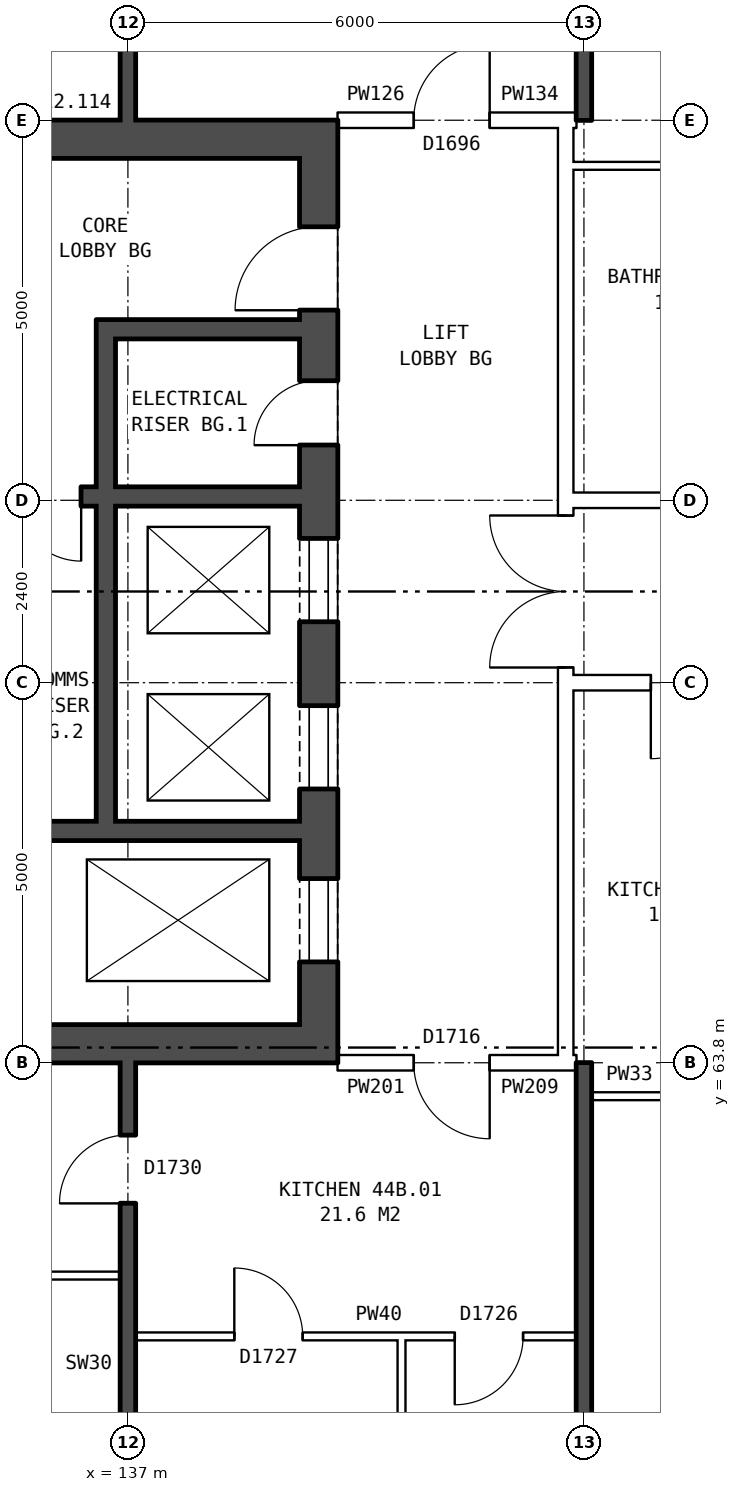
"""IFC4 building model, lengths in metres.
Left out: names, types, materials, properties, quantities, classifications, styles, units other than length and angle.
Written with IfcOpenShell. Run it as: python <this file> out.ifc"""

import sys

from ifc_helpers import new_model, si_unit, direction, frame, frame_2d, origin, place, context, subcontext, project, spatial, rectangle, extrude, element, fill, save


model = new_model("IFC4")
c1 = context("Model", 3, precision=1e-05, world=origin(), true_north=direction((0.0, 1.0)))
c2 = subcontext(c1, "Body", "Model", "MODEL_VIEW")
j1 = project(units=[si_unit("LENGTHUNIT", "METRE"), si_unit("PLANEANGLEUNIT", "RADIAN")], contexts=[c1])
p1 = place(None, origin())
s1 = spatial("IfcSite", under=j1, at=p1, CompositionType="ELEMENT")
p2 = place(p1, origin())
s2 = spatial("IfcBuilding", under=s1, at=p2, CompositionType="ELEMENT")
p3 = place(p2, frame((0.0, 0.0, 157.8)))
s3 = spatial("IfcBuildingStorey", under=s2, at=p3, CompositionType="ELEMENT", Elevation=157.8)
p4 = place(p3, frame((139.51, 63.8, 0.0), z_axis=(0.0, 0.0, 1.0), x_axis=(0.0, 1.0, 0.0)))
e1 = element("IfcWall", 1, at=p4, inside=s3, PredefinedType="SHEAR", context=c2, shape_type="SweptSolid", body=[
    extrude(rectangle(XDim=12.4, YDim=0.5, at=frame_2d((6.2, 0.0))), origin(), (0.0, 0.0, 1.0), 2.85),
])
p5 = place(p4, frame((1.325, 0.0, 0.0)))
e2 = element("IfcOpeningElement", 2, at=p5, cuts=e1, PredefinedType="OPENING", context=c2, shape_type="SweptSolid", body=[
    extrude(rectangle(XDim=1.1, YDim=2.1, at=frame_2d((0.55, 1.05))), frame((0.0, 0.26, 0.0), z_axis=(0.0, -1.0, 0.0), x_axis=(1.0, 0.0, 0.0)), (0.0, 0.0, 1.0), 0.52),
])
p6 = place(p4, frame((3.6, 0.0, 0.0)))
e3 = element("IfcOpeningElement", 3, at=p6, cuts=e1, PredefinedType="OPENING", context=c2, shape_type="SweptSolid", body=[
    extrude(rectangle(XDim=1.1, YDim=2.1, at=frame_2d((0.55, 1.05))), frame((0.0, 0.26, 0.0), z_axis=(0.0, -1.0, 0.0), x_axis=(1.0, 0.0, 0.0)), (0.0, 0.0, 1.0), 0.52),
])
p7 = place(p4, frame((5.8, 0.0, 0.0)))
e4 = element("IfcOpeningElement", 4, at=p7, cuts=e1, PredefinedType="OPENING", context=c2, shape_type="SweptSolid", body=[
    extrude(rectangle(XDim=1.1, YDim=2.1, at=frame_2d((0.55, 1.05))), frame((0.0, 0.26, 0.0), z_axis=(0.0, -1.0, 0.0), x_axis=(1.0, 0.0, 0.0)), (0.0, 0.0, 1.0), 0.52),
])
p8 = place(p4, frame((9.9, 0.0, 0.0)))
e5 = element("IfcOpeningElement", 5, at=p8, cuts=e1, PredefinedType="OPENING", context=c2, shape_type="SweptSolid", body=[
    extrude(rectangle(XDim=1.1, YDim=2.1, at=frame_2d((0.55, 1.05))), frame((0.0, 0.26, 0.0), z_axis=(0.0, -1.0, 0.0), x_axis=(1.0, 0.0, 0.0)), (0.0, 0.0, 1.0), 0.52),
])
p9 = place(p4, frame((8.125, 0.0, 0.0)))
e6 = element("IfcOpeningElement", 6, at=p9, cuts=e1, PredefinedType="OPENING", context=c2, shape_type="SweptSolid", body=[
    extrude(rectangle(XDim=0.85, YDim=2.1, at=frame_2d((0.425, 1.05))), frame((0.0, 0.26, 0.0), z_axis=(0.0, -1.0, 0.0), x_axis=(1.0, 0.0, 0.0)), (0.0, 0.0, 1.0), 0.52),
])
for number, where, z_axis, x_axis in (
    (7, (139.26, 64.05, 0.0), (0.0, 0.0, 1.0), (-1.0, 0.0, 0.0)),
    (8, (139.26, 75.95, 0.0), (0.0, 0.0, 1.0), (-1.0, 0.0, 0.0)),
):
    element("IfcWall", number, at=place(p3, frame(where, z_axis=z_axis, x_axis=x_axis)), inside=s3, PredefinedType="SHEAR", context=c2, shape_type="SweptSolid", body=[
        extrude(rectangle(XDim=7.4, YDim=0.5, at=frame_2d((3.7, 0.0))), origin(), (0.0, 0.0, 1.0), 2.85),
    ])
p10 = place(p3, frame((139.26, 66.85, 0.0), z_axis=(0.0, 0.0, 1.0), x_axis=(-1.0, 0.0, 0.0)))
e9 = element("IfcWall", 9, at=p10, inside=s3, PredefinedType="SHEAR", context=c2, shape_type="SweptSolid", body=[
    extrude(rectangle(XDim=4.575, YDim=0.25, at=frame_2d((2.288, 0.0))), origin(), (0.0, 0.0, 1.0), 2.85),
])
p11 = place(p3, frame((139.26, 71.25, 0.0), z_axis=(0.0, 0.0, 1.0), x_axis=(-1.0, 0.0, 0.0)))
e10 = element("IfcWall", 10, at=p11, inside=s3, PredefinedType="SHEAR", context=c2, shape_type="SweptSolid", body=[
    extrude(rectangle(XDim=7.4, YDim=0.25, at=frame_2d((3.7, 0.0))), origin(), (0.0, 0.0, 1.0), 2.85),
])
p12 = place(p11, frame((4.975, 0.0, 0.0)))
e11 = element("IfcOpeningElement", 11, at=p12, cuts=e10, PredefinedType="OPENING", context=c2, shape_type="SweptSolid", body=[
    extrude(rectangle(XDim=1.1, YDim=2.1, at=frame_2d((0.55, 1.05))), frame((0.0, 0.135, 0.0), z_axis=(0.0, -1.0, 0.0), x_axis=(1.0, 0.0, 0.0)), (0.0, 0.0, 1.0), 0.27),
])
p13 = place(p11, frame((2.875, 0.0, 0.0)))
e12 = element("IfcOpeningElement", 12, at=p13, cuts=e10, PredefinedType="OPENING", context=c2, shape_type="SweptSolid", body=[
    extrude(rectangle(XDim=0.85, YDim=2.1, at=frame_2d((0.425, 1.05))), frame((0.0, 0.135, 0.0), z_axis=(0.0, -1.0, 0.0), x_axis=(1.0, 0.0, 0.0)), (0.0, 0.0, 1.0), 0.27),
])
p14 = place(p3, frame((139.26, 73.45, 0.0), z_axis=(0.0, 0.0, 1.0), x_axis=(-1.0, 0.0, 0.0)))
e13 = element("IfcWall", 13, at=p14, inside=s3, PredefinedType="SHEAR", context=c2, shape_type="SweptSolid", body=[
    extrude(rectangle(XDim=2.425, YDim=0.25, at=frame_2d((1.212, 0.0))), origin(), (0.0, 0.0, 1.0), 2.85),
])
p15 = place(p3, frame((136.71, 66.975, 0.0), z_axis=(0.0, 0.0, 1.0), x_axis=(0.0, 1.0, 0.0)))
e14 = element("IfcWall", 14, at=p15, inside=s3, PredefinedType="SHEAR", context=c2, shape_type="SweptSolid", body=[
    extrude(rectangle(XDim=4.15, YDim=0.25, at=frame_2d((2.075, 0.0))), origin(), (0.0, 0.0, 1.0), 2.85),
])
p16 = place(p3, frame((136.71, 71.375, 0.0), z_axis=(0.0, 0.0, 1.0), x_axis=(0.0, 1.0, 0.0)))
e15 = element("IfcWall", 15, at=p16, inside=s3, PredefinedType="SHEAR", context=c2, shape_type="SweptSolid", body=[
    extrude(rectangle(XDim=2.2, YDim=0.25, at=frame_2d((1.1, 0.0))), origin(), (0.0, 0.0, 1.0), 2.85),
])
p17 = place(p3, frame((142.76, 63.9, 0.0), z_axis=(0.0, 0.0, 1.0), x_axis=(0.0, 1.0, 0.0)))
e16 = element("IfcWall", 16, at=p17, inside=s3, PredefinedType="PARTITIONING", context=c2, shape_type="SweptSolid", body=[
    extrude(rectangle(XDim=12.2, YDim=0.2, at=frame_2d((6.1, 0.0))), origin(), (0.0, 0.0, 1.0), 2.85),
])
p18 = place(p17, frame((5.1, 0.0, 0.0)))
e17 = element("IfcOpeningElement", 17, at=p18, cuts=e16, PredefinedType="OPENING", context=c2, shape_type="SweptSolid", body=[
    extrude(rectangle(XDim=2.0, YDim=2.1, at=frame_2d((1.0, 1.05))), frame((0.0, 0.11, 0.0), z_axis=(0.0, -1.0, 0.0), x_axis=(1.0, 0.0, 0.0)), (0.0, 0.0, 1.0), 0.22),
])
p19 = place(p3, frame((137.1, 60.2, 0.0), z_axis=(0.0, 0.0, 1.0), x_axis=(1.0, 0.0, 0.0)))
e18 = element("IfcWall", 18, at=p19, inside=s3, PredefinedType="PARTITIONING", context=c2, shape_type="SweptSolid", body=[
    extrude(rectangle(XDim=5.8, YDim=0.1, at=frame_2d((2.9, 0.0))), origin(), (0.0, 0.0, 1.0), 2.85),
])
p20 = place(p19, frame((1.3, 0.0, 0.0)))
e19 = element("IfcOpeningElement", 19, at=p20, cuts=e18, PredefinedType="OPENING", context=c2, shape_type="SweptSolid", body=[
    extrude(rectangle(XDim=0.9, YDim=2.1, at=frame_2d((0.45, 1.05))), frame((0.0, 0.06, 0.0), z_axis=(0.0, -1.0, 0.0), x_axis=(1.0, 0.0, 0.0)), (0.0, 0.0, 1.0), 0.12),
])
p21 = place(p19, frame((4.2, 0.0, 0.0)))
e20 = element("IfcOpeningElement", 20, at=p21, cuts=e18, PredefinedType="OPENING", context=c2, shape_type="SweptSolid", body=[
    extrude(rectangle(XDim=0.9, YDim=2.1, at=frame_2d((0.45, 1.05))), frame((0.0, 0.06, 0.0), z_axis=(0.0, -1.0, 0.0), x_axis=(1.0, 0.0, 0.0)), (0.0, 0.0, 1.0), 0.12),
])
p22 = place(p3, frame((131.36, 61.0, 0.0), z_axis=(0.0, 0.0, 1.0), x_axis=(1.0, 0.0, 0.0)))
e21 = element("IfcWall", 21, at=p22, inside=s3, PredefinedType="PARTITIONING", context=c2, shape_type="SweptSolid", body=[
    extrude(rectangle(XDim=5.54, YDim=0.1, at=frame_2d((2.77, 0.0))), origin(), (0.0, 0.0, 1.0), 2.85),
])
p23 = place(p3, frame((143.1, 63.36, 0.0), z_axis=(0.0, 0.0, 1.0), x_axis=(1.0, 0.0, 0.0)))
e22 = element("IfcWall", 22, at=p23, inside=s3, PredefinedType="PARTITIONING", context=c2, shape_type="SweptSolid", body=[
    extrude(rectangle(XDim=2.9, YDim=0.1, at=frame_2d((1.45, 0.0))), origin(), (0.0, 0.0, 1.0), 2.85),
])
p24 = place(p23, frame((1.0, 0.0, 0.0)))
e23 = element("IfcOpeningElement", 23, at=p24, cuts=e22, PredefinedType="OPENING", context=c2, shape_type="SweptSolid", body=[
    extrude(rectangle(XDim=0.9, YDim=2.1, at=frame_2d((0.45, 1.05))), frame((0.0, 0.06, 0.0), z_axis=(0.0, -1.0, 0.0), x_axis=(1.0, 0.0, 0.0)), (0.0, 0.0, 1.0), 0.12),
])
p25 = place(p3, frame((139.76, 63.8, 0.0), z_axis=(0.0, 0.0, 1.0), x_axis=(1.0, 0.0, 0.0)))
e24 = element("IfcWall", 24, at=p25, inside=s3, PredefinedType="PARTITIONING", context=c2, shape_type="SweptSolid", body=[
    extrude(rectangle(XDim=3.0, YDim=0.2, at=frame_2d((1.5, 0.0))), origin(), (0.0, 0.0, 1.0), 2.85),
])
p26 = place(p25, frame((1.0, 0.0, 0.0)))
e25 = element("IfcOpeningElement", 25, at=p26, cuts=e24, PredefinedType="OPENING", context=c2, shape_type="SweptSolid", body=[
    extrude(rectangle(XDim=1.0, YDim=2.1, at=frame_2d((0.5, 1.05))), frame((0.0, 0.11, 0.0), z_axis=(0.0, -1.0, 0.0), x_axis=(1.0, 0.0, 0.0)), (0.0, 0.0, 1.0), 0.22),
])
p27 = place(p3, frame((142.76, 63.8, 0.0), z_axis=(0.0, 0.0, 1.0), x_axis=(1.0, 0.0, 0.0)))
e26 = element("IfcWall", 26, at=p27, inside=s3, PredefinedType="PARTITIONING", context=c2, shape_type="SweptSolid", body=[
    extrude(rectangle(XDim=0.14, YDim=0.2, at=frame_2d((0.07, 0.0))), origin(), (0.0, 0.0, 1.0), 2.85),
])
p28 = place(p3, frame((142.76, 68.8, 0.0), z_axis=(0.0, 0.0, 1.0), x_axis=(1.0, 0.0, 0.0)))
e27 = element("IfcWall", 27, at=p28, inside=s3, PredefinedType="PARTITIONING", context=c2, shape_type="SweptSolid", body=[
    extrude(rectangle(XDim=14.48, YDim=0.2, at=frame_2d((7.24, 0.0))), origin(), (0.0, 0.0, 1.0), 2.85),
])
p29 = place(p28, frame((1.12, 0.0, 0.0)))
e28 = element("IfcOpeningElement", 28, at=p29, cuts=e27, PredefinedType="OPENING", context=c2, shape_type="SweptSolid", body=[
    extrude(rectangle(XDim=1.0, YDim=2.1, at=frame_2d((0.5, 1.05))), frame((0.0, 0.11, 0.0), z_axis=(0.0, -1.0, 0.0), x_axis=(1.0, 0.0, 0.0)), (0.0, 0.0, 1.0), 0.22),
])
p30 = place(p28, frame((7.24, 0.0, 0.0)))
e29 = element("IfcOpeningElement", 29, at=p30, cuts=e27, PredefinedType="OPENING", context=c2, shape_type="SweptSolid", body=[
    extrude(rectangle(XDim=1.0, YDim=2.1, at=frame_2d((0.5, 1.05))), frame((0.0, 0.11, 0.0), z_axis=(0.0, -1.0, 0.0), x_axis=(1.0, 0.0, 0.0)), (0.0, 0.0, 1.0), 0.22),
])
p31 = place(p3, frame((142.76, 71.2, 0.0), z_axis=(0.0, 0.0, 1.0), x_axis=(1.0, 0.0, 0.0)))
e30 = element("IfcWall", 30, at=p31, inside=s3, PredefinedType="PARTITIONING", context=c2, shape_type="SweptSolid", body=[
    extrude(rectangle(XDim=14.48, YDim=0.2, at=frame_2d((7.24, 0.0))), origin(), (0.0, 0.0, 1.0), 2.85),
])
p32 = place(p31, frame((4.24, 0.0, 0.0)))
e31 = element("IfcOpeningElement", 31, at=p32, cuts=e30, PredefinedType="OPENING", context=c2, shape_type="SweptSolid", body=[
    extrude(rectangle(XDim=1.0, YDim=2.1, at=frame_2d((0.5, 1.05))), frame((0.0, 0.11, 0.0), z_axis=(0.0, -1.0, 0.0), x_axis=(1.0, 0.0, 0.0)), (0.0, 0.0, 1.0), 0.22),
])
p33 = place(p31, frame((7.24, 0.0, 0.0)))
e32 = element("IfcOpeningElement", 32, at=p33, cuts=e30, PredefinedType="OPENING", context=c2, shape_type="SweptSolid", body=[
    extrude(rectangle(XDim=1.0, YDim=2.1, at=frame_2d((0.5, 1.05))), frame((0.0, 0.11, 0.0), z_axis=(0.0, -1.0, 0.0), x_axis=(1.0, 0.0, 0.0)), (0.0, 0.0, 1.0), 0.22),
])
p34 = place(p3, frame((142.76, 75.6, 0.0), z_axis=(0.0, 0.0, 1.0), x_axis=(1.0, 0.0, 0.0)))
e33 = element("IfcWall", 33, at=p34, inside=s3, PredefinedType="PARTITIONING", context=c2, shape_type="SweptSolid", body=[
    extrude(rectangle(XDim=3.24, YDim=0.1, at=frame_2d((1.62, 0.0))), origin(), (0.0, 0.0, 1.0), 2.85),
])
p35 = place(p3, frame((139.76, 76.2, 0.0), z_axis=(0.0, 0.0, 1.0), x_axis=(1.0, 0.0, 0.0)))
e34 = element("IfcWall", 34, at=p35, inside=s3, PredefinedType="PARTITIONING", context=c2, shape_type="SweptSolid", body=[
    extrude(rectangle(XDim=3.0, YDim=0.2, at=frame_2d((1.5, 0.0))), origin(), (0.0, 0.0, 1.0), 2.85),
])
p36 = place(p35, frame((1.0, 0.0, 0.0)))
e35 = element("IfcOpeningElement", 35, at=p36, cuts=e34, PredefinedType="OPENING", context=c2, shape_type="SweptSolid", body=[
    extrude(rectangle(XDim=1.0, YDim=2.1, at=frame_2d((0.5, 1.05))), frame((0.0, 0.11, 0.0), z_axis=(0.0, -1.0, 0.0), x_axis=(1.0, 0.0, 0.0)), (0.0, 0.0, 1.0), 0.22),
])
p37 = place(p3, frame((142.76, 76.2, 0.0), z_axis=(0.0, 0.0, 1.0), x_axis=(1.0, 0.0, 0.0)))
e36 = element("IfcWall", 36, at=p37, inside=s3, PredefinedType="PARTITIONING", context=c2, shape_type="SweptSolid", body=[
    extrude(rectangle(XDim=0.14, YDim=0.2, at=frame_2d((0.07, 0.0))), origin(), (0.0, 0.0, 1.0), 2.85),
])
p38 = place(p3, frame((137.0, 54.36, 0.0), z_axis=(0.0, 0.0, 1.0), x_axis=(0.0, 1.0, 0.0)))
e37 = element("IfcWall", 37, at=p38, inside=s3, PredefinedType="SOLIDWALL", context=c2, shape_type="SweptSolid", body=[
    extrude(rectangle(XDim=9.44, YDim=0.2, at=frame_2d((4.72, 0.0))), origin(), (0.0, 0.0, 1.0), 2.85),
])
p39 = place(p38, frame((2.47, 0.0, 0.0)))
e38 = element("IfcOpeningElement", 38, at=p39, cuts=e37, PredefinedType="OPENING", context=c2, shape_type="SweptSolid", body=[
    extrude(rectangle(XDim=0.9, YDim=2.1, at=frame_2d((0.45, 1.05))), frame((0.0, 0.11, 0.0), z_axis=(0.0, -1.0, 0.0), x_axis=(1.0, 0.0, 0.0)), (0.0, 0.0, 1.0), 0.22),
])
p40 = place(p38, frame((7.59, 0.0, 0.0)))
e39 = element("IfcOpeningElement", 39, at=p40, cuts=e37, PredefinedType="OPENING", context=c2, shape_type="SweptSolid", body=[
    extrude(rectangle(XDim=0.9, YDim=2.1, at=frame_2d((0.45, 1.05))), frame((0.0, 0.11, 0.0), z_axis=(0.0, -1.0, 0.0), x_axis=(1.0, 0.0, 0.0)), (0.0, 0.0, 1.0), 0.22),
])
p41 = place(p3, frame((137.0, 76.2, 0.0), z_axis=(0.0, 0.0, 1.0), x_axis=(0.0, 1.0, 0.0)))
e40 = element("IfcWall", 40, at=p41, inside=s3, PredefinedType="SOLIDWALL", context=c2, shape_type="SweptSolid", body=[
    extrude(rectangle(XDim=9.44, YDim=0.2, at=frame_2d((4.72, 0.0))), origin(), (0.0, 0.0, 1.0), 2.85),
])
p42 = place(p41, frame((1.35, 0.0, 0.0)))
e41 = element("IfcOpeningElement", 41, at=p42, cuts=e40, PredefinedType="OPENING", context=c2, shape_type="SweptSolid", body=[
    extrude(rectangle(XDim=0.9, YDim=2.1, at=frame_2d((0.45, 1.05))), frame((0.0, 0.11, 0.0), z_axis=(0.0, -1.0, 0.0), x_axis=(1.0, 0.0, 0.0)), (0.0, 0.0, 1.0), 0.22),
])
p43 = place(p3, frame((140.6, 57.85, 0.0), z_axis=(0.0, 0.0, 1.0), x_axis=(0.0, 1.0, 0.0)))
e42 = element("IfcWall", 42, at=p43, inside=s3, PredefinedType="PARTITIONING", context=c2, shape_type="SweptSolid", body=[
    extrude(rectangle(XDim=2.3, YDim=0.1, at=frame_2d((1.15, 0.0))), origin(), (0.0, 0.0, 1.0), 2.85),
])
for number, where, z_axis, x_axis in (
    (43, (143.0, 54.36, 0.0), (0.0, 0.0, 1.0), (0.0, 1.0, 0.0)),
    (44, (143.0, 76.2, 0.0), (0.0, 0.0, 1.0), (0.0, 1.0, 0.0)),
):
    element("IfcWall", number, at=place(p3, frame(where, z_axis=z_axis, x_axis=x_axis)), inside=s3, PredefinedType="SOLIDWALL", context=c2, shape_type="SweptSolid", body=[
        extrude(rectangle(XDim=9.44, YDim=0.2, at=frame_2d((4.72, 0.0))), origin(), (0.0, 0.0, 1.0), 2.85),
    ])
p44 = place(p5, origin())
e45 = element("IfcDoor", 45, at=p44, inside=s3, OperationType="DOUBLE_DOOR_SLIDING", PredefinedType="DOOR", context=c2, shape_type="SweptSolid", body=[
    extrude(rectangle(XDim=1.1, YDim=2.1, at=frame_2d((0.55, 1.05))), frame((0.0, 0.235, 0.0), z_axis=(0.0, -1.0, 0.0), x_axis=(1.0, 0.0, 0.0)), (0.0, 0.0, 1.0), 0.05),
])
fill(e2, e45)
p45 = place(p6, origin())
e46 = element("IfcDoor", 46, at=p45, inside=s3, OperationType="DOUBLE_DOOR_SLIDING", PredefinedType="DOOR", context=c2, shape_type="SweptSolid", body=[
    extrude(rectangle(XDim=1.1, YDim=2.1, at=frame_2d((0.55, 1.05))), frame((0.0, 0.235, 0.0), z_axis=(0.0, -1.0, 0.0), x_axis=(1.0, 0.0, 0.0)), (0.0, 0.0, 1.0), 0.05),
])
fill(e3, e46)
p46 = place(p7, origin())
e47 = element("IfcDoor", 47, at=p46, inside=s3, OperationType="DOUBLE_DOOR_SLIDING", PredefinedType="DOOR", context=c2, shape_type="SweptSolid", body=[
    extrude(rectangle(XDim=1.1, YDim=2.1, at=frame_2d((0.55, 1.05))), frame((0.0, 0.235, 0.0), z_axis=(0.0, -1.0, 0.0), x_axis=(1.0, 0.0, 0.0)), (0.0, 0.0, 1.0), 0.05),
])
fill(e4, e47)
p47 = place(p8, origin())
e48 = element("IfcDoor", 48, at=p47, inside=s3, OperationType="SINGLE_SWING_LEFT", PredefinedType="DOOR", context=c2, shape_type="SweptSolid", body=[
    extrude(rectangle(XDim=1.1, YDim=2.1, at=frame_2d((0.55, 1.05))), frame((0.0, 0.235, 0.0), z_axis=(0.0, -1.0, 0.0), x_axis=(1.0, 0.0, 0.0)), (0.0, 0.0, 1.0), 0.05),
])
fill(e5, e48)
p48 = place(p9, origin())
e49 = element("IfcDoor", 49, at=p48, inside=s3, OperationType="SINGLE_SWING_LEFT", PredefinedType="DOOR", context=c2, shape_type="SweptSolid", body=[
    extrude(rectangle(XDim=0.85, YDim=2.1, at=frame_2d((0.425, 1.05))), frame((0.0, 0.235, 0.0), z_axis=(0.0, -1.0, 0.0), x_axis=(1.0, 0.0, 0.0)), (0.0, 0.0, 1.0), 0.05),
])
fill(e6, e49)
p49 = place(p13, origin())
e50 = element("IfcDoor", 50, at=p49, inside=s3, OperationType="SINGLE_SWING_LEFT", PredefinedType="DOOR", context=c2, shape_type="SweptSolid", body=[
    extrude(rectangle(XDim=0.85, YDim=2.1, at=frame_2d((0.425, 1.05))), frame((0.0, 0.025, 0.0), z_axis=(0.0, -1.0, 0.0), x_axis=(1.0, 0.0, 0.0)), (0.0, 0.0, 1.0), 0.05),
])
fill(e12, e50)
p50 = place(p18, origin())
e51 = element("IfcDoor", 51, at=p50, inside=s3, OperationType="DOUBLE_DOOR_SINGLE_SWING", PredefinedType="DOOR", context=c2, shape_type="SweptSolid", body=[
    extrude(rectangle(XDim=2.0, YDim=2.1, at=frame_2d((1.0, 1.05))), frame((0.0, 0.025, 0.0), z_axis=(0.0, -1.0, 0.0), x_axis=(1.0, 0.0, 0.0)), (0.0, 0.0, 1.0), 0.05),
])
fill(e17, e51)
p51 = place(p40, origin())
e52 = element("IfcDoor", 52, at=p51, inside=s3, OperationType="SINGLE_SWING_LEFT", PredefinedType="DOOR", context=c2, shape_type="SweptSolid", body=[
    extrude(rectangle(XDim=0.9, YDim=2.1, at=frame_2d((0.45, 1.05))), frame((0.0, 0.025, 0.0), z_axis=(0.0, -1.0, 0.0), x_axis=(1.0, 0.0, 0.0)), (0.0, 0.0, 1.0), 0.05),
])
fill(e39, e52)
p52 = place(p26, frame((1.0, 0.0, 0.0), z_axis=(0.0, 0.0, 1.0), x_axis=(-1.0, 0.0, 0.0)))
e53 = element("IfcDoor", 53, at=p52, inside=s3, OperationType="SINGLE_SWING_LEFT", PredefinedType="DOOR", context=c2, shape_type="SweptSolid", body=[
    extrude(rectangle(XDim=1.0, YDim=2.1, at=frame_2d((0.5, 1.05))), frame((0.0, 0.025, 0.0), z_axis=(0.0, -1.0, 0.0), x_axis=(1.0, 0.0, 0.0)), (0.0, 0.0, 1.0), 0.05),
])
fill(e25, e53)
p53 = place(p20, origin())
e54 = element("IfcDoor", 54, at=p53, inside=s3, OperationType="SINGLE_SWING_LEFT", PredefinedType="DOOR", context=c2, shape_type="SweptSolid", body=[
    extrude(rectangle(XDim=0.9, YDim=2.1, at=frame_2d((0.45, 1.05))), frame((0.0, 0.025, 0.0), z_axis=(0.0, -1.0, 0.0), x_axis=(1.0, 0.0, 0.0)), (0.0, 0.0, 1.0), 0.05),
])
fill(e19, e54)
p54 = place(p21, frame((0.9, 0.0, 0.0), z_axis=(0.0, 0.0, 1.0), x_axis=(-1.0, 0.0, 0.0)))
e55 = element("IfcDoor", 55, at=p54, inside=s3, OperationType="SINGLE_SWING_RIGHT", PredefinedType="DOOR", context=c2, shape_type="SweptSolid", body=[
    extrude(rectangle(XDim=0.9, YDim=2.1, at=frame_2d((0.45, 1.05))), frame((0.0, 0.025, 0.0), z_axis=(0.0, -1.0, 0.0), x_axis=(1.0, 0.0, 0.0)), (0.0, 0.0, 1.0), 0.05),
])
fill(e20, e55)
p55 = place(p36, origin())
e56 = element("IfcDoor", 56, at=p55, inside=s3, OperationType="SINGLE_SWING_RIGHT", PredefinedType="DOOR", context=c2, shape_type="SweptSolid", body=[
    extrude(rectangle(XDim=1.0, YDim=2.1, at=frame_2d((0.5, 1.05))), frame((0.0, 0.025, 0.0), z_axis=(0.0, -1.0, 0.0), x_axis=(1.0, 0.0, 0.0)), (0.0, 0.0, 1.0), 0.05),
])
fill(e35, e56)
p56 = place(p29, frame((1.0, 0.0, 0.0), z_axis=(0.0, 0.0, 1.0), x_axis=(-1.0, 0.0, 0.0)))
e57 = element("IfcDoor", 57, at=p56, inside=s3, OperationType="SINGLE_SWING_RIGHT", PredefinedType="DOOR", context=c2, shape_type="SweptSolid", body=[
    extrude(rectangle(XDim=1.0, YDim=2.1, at=frame_2d((0.5, 1.05))), frame((0.0, 0.025, 0.0), z_axis=(0.0, -1.0, 0.0), x_axis=(1.0, 0.0, 0.0)), (0.0, 0.0, 1.0), 0.05),
])
fill(e28, e57)
save(model, sys.argv[1])
